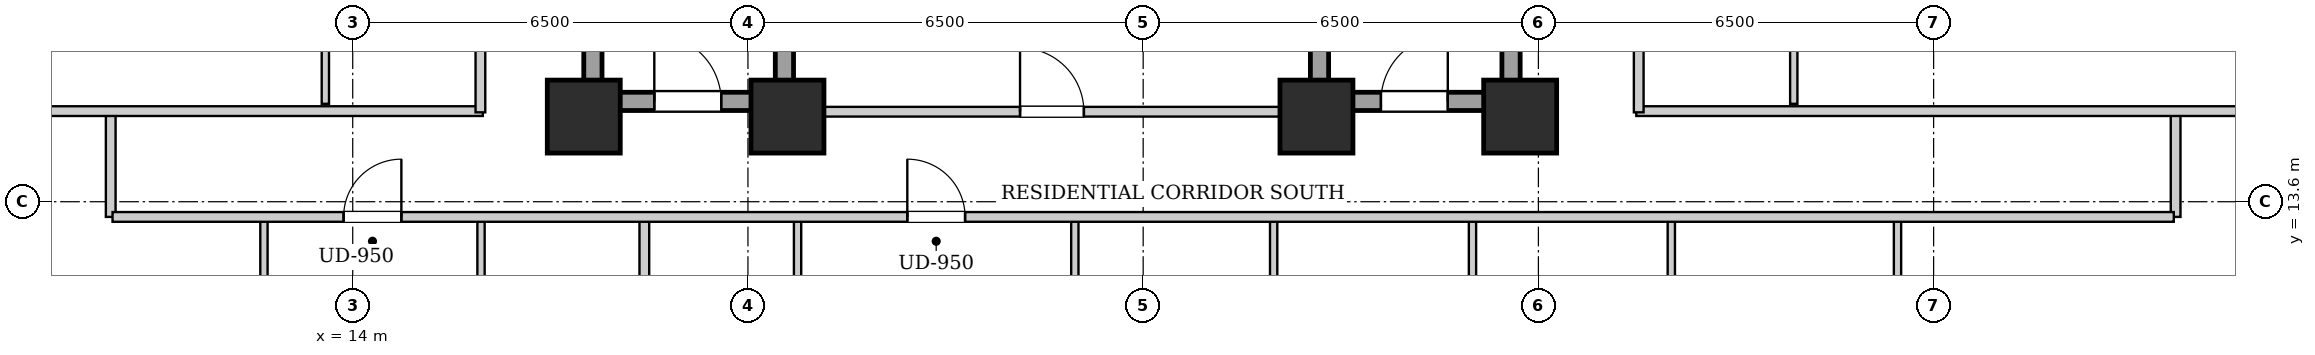
"""IFC4 building model, lengths in metres.
Left out: names, types, materials, properties, quantities, classifications, styles, units other than length and angle.
Written with IfcOpenShell. Run it as: python <this file> out.ifc"""

import sys

from ifc_helpers import new_model, si_unit, direction, frame, frame_2d, origin, origin_2d, place, context, subcontext, project, spatial, rectangle, extrude, element, fill, save


model = new_model("IFC4")
c1 = context("Model", 3, precision=1e-05, world=origin(), true_north=direction((0.0, 1.0)))
c2 = subcontext(c1, "Body", "Model", "MODEL_VIEW")
j1 = project(units=[si_unit("LENGTHUNIT", "METRE"), si_unit("PLANEANGLEUNIT", "RADIAN")], contexts=[c1])
p1 = place(None, origin())
s1 = spatial("IfcSite", under=j1, at=p1, CompositionType="ELEMENT")
p2 = place(p1, origin())
s2 = spatial("IfcBuilding", under=s1, at=p2, CompositionType="ELEMENT")
p3 = place(p2, frame((0.0, 0.0, 67.4)))
s3 = spatial("IfcBuildingStorey", under=s2, at=p3, CompositionType="ELEMENT", Elevation=67.4)
for number, where, z_axis, x_axis in (
    (1, (17.8, 15.0, 0.0), (0.0, 0.0, 1.0), (1.0, 0.0, 0.0)),
    (2, (21.15, 15.0, 0.0), (0.0, 0.0, 1.0), (1.0, 0.0, 0.0)),
    (3, (29.85, 15.0, 0.0), (0.0, 0.0, 1.0), (1.0, 0.0, 0.0)),
    (4, (33.2, 15.0, 0.0), (0.0, 0.0, 1.0), (1.0, 0.0, 0.0)),
):
    element("IfcColumn", number, at=place(p3, frame(where, z_axis=z_axis, x_axis=x_axis)), inside=s3, PredefinedType="COLUMN", context=c2, shape_type="SweptSolid", body=[
        extrude(rectangle(XDim=1.2, YDim=1.2, at=origin_2d()), origin(), (0.0, 0.0, 1.0), 3.2),
    ])
for number, where, z_axis, x_axis in (
    (5, (17.95, 15.1, 0.0), (0.0, 0.0, 1.0), (0.0, 1.0, 0.0)),
    (6, (21.1, 15.1, 0.0), (0.0, 0.0, 1.0), (0.0, 1.0, 0.0)),
):
    element("IfcWall", number, at=place(p3, frame(where, z_axis=z_axis, x_axis=x_axis)), inside=s3, PredefinedType="SHEAR", context=c2, shape_type="SweptSolid", body=[
        extrude(rectangle(XDim=9.0, YDim=0.3, at=frame_2d((4.5, 0.0))), origin(), (0.0, 0.0, 1.0), 2.88),
    ])
p4 = place(p3, frame((18.1, 15.25, 0.0), z_axis=(0.0, 0.0, 1.0), x_axis=(1.0, 0.0, 0.0)))
e7 = element("IfcWall", 7, at=p4, inside=s3, PredefinedType="SHEAR", context=c2, shape_type="SweptSolid", body=[
    extrude(rectangle(XDim=2.85, YDim=0.3, at=frame_2d((1.425, 0.0))), origin(), (0.0, 0.0, 1.0), 2.88),
])
p5 = place(p4, frame((0.86, 0.0, 0.0)))
e8 = element("IfcOpeningElement", 8, at=p5, cuts=e7, PredefinedType="OPENING", context=c2, shape_type="SweptSolid", body=[
    extrude(rectangle(XDim=1.1, YDim=2.05, at=frame_2d((0.55, 1.025))), frame((0.0, 0.16, 0.0), z_axis=(0.0, -1.0, 0.0), x_axis=(1.0, 0.0, 0.0)), (0.0, 0.0, 1.0), 0.32),
])
for number, where, z_axis, x_axis in (
    (9, (29.9, 15.1, 0.0), (0.0, 0.0, 1.0), (0.0, 1.0, 0.0)),
    (10, (33.05, 15.1, 0.0), (0.0, 0.0, 1.0), (0.0, 1.0, 0.0)),
):
    element("IfcWall", number, at=place(p3, frame(where, z_axis=z_axis, x_axis=x_axis)), inside=s3, PredefinedType="SHEAR", context=c2, shape_type="SweptSolid", body=[
        extrude(rectangle(XDim=9.0, YDim=0.3, at=frame_2d((4.5, 0.0))), origin(), (0.0, 0.0, 1.0), 2.88),
    ])
p6 = place(p3, frame((30.05, 15.25, 0.0), z_axis=(0.0, 0.0, 1.0), x_axis=(1.0, 0.0, 0.0)))
e11 = element("IfcWall", 11, at=p6, inside=s3, PredefinedType="SHEAR", context=c2, shape_type="SweptSolid", body=[
    extrude(rectangle(XDim=2.85, YDim=0.3, at=frame_2d((1.425, 0.0))), origin(), (0.0, 0.0, 1.0), 2.88),
])
p7 = place(p6, frame((0.86, 0.0, 0.0)))
e12 = element("IfcOpeningElement", 12, at=p7, cuts=e11, PredefinedType="OPENING", context=c2, shape_type="SweptSolid", body=[
    extrude(rectangle(XDim=1.1, YDim=2.05, at=frame_2d((0.55, 1.025))), frame((0.0, 0.16, 0.0), z_axis=(0.0, -1.0, 0.0), x_axis=(1.0, 0.0, 0.0)), (0.0, 0.0, 1.0), 0.32),
])
p8 = place(p3, frame((21.25, 15.08, 0.0), z_axis=(0.0, 0.0, 1.0), x_axis=(1.0, 0.0, 0.0)))
e13 = element("IfcWall", 13, at=p8, inside=s3, PredefinedType="PARTITIONING", context=c2, shape_type="SweptSolid", body=[
    extrude(rectangle(XDim=8.5, YDim=0.16, at=frame_2d((4.25, 0.0))), origin(), (0.0, 0.0, 1.0), 2.172),
])
p9 = place(p8, frame((3.725, 0.0, 0.0)))
e14 = element("IfcOpeningElement", 14, at=p9, cuts=e13, PredefinedType="OPENING", context=c2, shape_type="SweptSolid", body=[
    extrude(rectangle(XDim=1.05, YDim=2.05, at=frame_2d((0.525, 1.025))), frame((0.0, 0.09, 0.0), z_axis=(0.0, -1.0, 0.0), x_axis=(1.0, 0.0, 0.0)), (0.0, 0.0, 1.0), 0.18),
])
for number, where, z_axis, x_axis in (
    (15, (10.02, 13.35, 0.0), (0.0, 0.0, 1.0), (0.0, 1.0, 0.0)),
    (16, (43.98, 13.35, 0.0), (0.0, 0.0, 1.0), (0.0, 1.0, 0.0)),
):
    element("IfcWall", number, at=place(p3, frame(where, z_axis=z_axis, x_axis=x_axis)), inside=s3, PredefinedType="PARTITIONING", context=c2, shape_type="SweptSolid", body=[
        extrude(rectangle(XDim=1.74, YDim=0.16, at=frame_2d((0.87, 0.0))), origin(), (0.0, 0.0, 1.0), 2.88),
    ])
p10 = place(p3, frame((7.78, 15.09, 0.0), z_axis=(0.0, 0.0, 1.0), x_axis=(1.0, 0.0, 0.0)))
e17 = element("IfcWall", 17, at=p10, inside=s3, PredefinedType="PARTITIONING", context=c2, shape_type="SweptSolid", body=[
    extrude(rectangle(XDim=8.36, YDim=0.16, at=frame_2d((4.18, 0.0))), origin(), (0.0, 0.0, 1.0), 2.172),
])
p11 = place(p3, frame((35.11, 15.09, 0.0), z_axis=(0.0, 0.0, 1.0), x_axis=(1.0, 0.0, 0.0)))
e18 = element("IfcWall", 18, at=p11, inside=s3, PredefinedType="PARTITIONING", context=c2, shape_type="SweptSolid", body=[
    extrude(rectangle(XDim=11.11, YDim=0.16, at=frame_2d((5.555, 0.0))), origin(), (0.0, 0.0, 1.0), 2.172),
])
p12 = place(p3, frame((12.54, 10.46, 0.0), z_axis=(0.0, 0.0, 1.0), x_axis=(0.0, 1.0, 0.0)))
e19 = element("IfcWall", 19, at=p12, inside=s3, PredefinedType="PARTITIONING", context=c2, shape_type="SweptSolid", body=[
    extrude(rectangle(XDim=2.85, YDim=0.12, at=frame_2d((1.425, 0.0))), origin(), (0.0, 0.0, 1.0), 2.88),
])
p13 = place(p12, frame((0.995, 0.0, 0.0)))
e20 = element("IfcOpeningElement", 20, at=p13, cuts=e19, PredefinedType="OPENING", context=c2, shape_type="SweptSolid", body=[
    extrude(rectangle(XDim=0.86, YDim=2.05, at=frame_2d((0.43, 1.025))), frame((0.0, 0.07, 0.0), z_axis=(0.0, -1.0, 0.0), x_axis=(1.0, 0.0, 0.0)), (0.0, 0.0, 1.0), 0.14),
])
p14 = place(p3, frame((16.11, 10.46, 0.0), z_axis=(0.0, 0.0, 1.0), x_axis=(0.0, 1.0, 0.0)))
e21 = element("IfcWall", 21, at=p14, inside=s3, PredefinedType="PARTITIONING", context=c2, shape_type="SweptSolid", body=[
    extrude(rectangle(XDim=2.85, YDim=0.12, at=frame_2d((1.425, 0.0))), origin(), (0.0, 0.0, 1.0), 2.88),
])
p15 = place(p14, frame((0.975, 0.0, 0.0)))
e22 = element("IfcOpeningElement", 22, at=p15, cuts=e21, PredefinedType="OPENING", context=c2, shape_type="SweptSolid", body=[
    extrude(rectangle(XDim=0.9, YDim=2.05, at=frame_2d((0.45, 1.025))), frame((0.0, 0.07, 0.0), z_axis=(0.0, -1.0, 0.0), x_axis=(1.0, 0.0, 0.0)), (0.0, 0.0, 1.0), 0.14),
])
p16 = place(p3, frame((18.796, 0.28, 0.0), z_axis=(0.0, 0.0, 1.0), x_axis=(0.0, 1.0, 0.0)))
e23 = element("IfcWall", 23, at=p16, inside=s3, PredefinedType="PARTITIONING", context=c2, shape_type="SweptSolid", body=[
    extrude(rectangle(XDim=13.03, YDim=0.16, at=frame_2d((6.515, 0.0))), origin(), (0.0, 0.0, 1.0), 2.88),
])
p17 = place(p3, frame((21.316, 10.46, 0.0), z_axis=(0.0, 0.0, 1.0), x_axis=(0.0, 1.0, 0.0)))
e24 = element("IfcWall", 24, at=p17, inside=s3, PredefinedType="PARTITIONING", context=c2, shape_type="SweptSolid", body=[
    extrude(rectangle(XDim=2.85, YDim=0.12, at=frame_2d((1.425, 0.0))), origin(), (0.0, 0.0, 1.0), 2.88),
])
p18 = place(p17, frame((0.995, 0.0, 0.0)))
e25 = element("IfcOpeningElement", 25, at=p18, cuts=e24, PredefinedType="OPENING", context=c2, shape_type="SweptSolid", body=[
    extrude(rectangle(XDim=0.86, YDim=2.05, at=frame_2d((0.43, 1.025))), frame((0.0, 0.07, 0.0), z_axis=(0.0, -1.0, 0.0), x_axis=(1.0, 0.0, 0.0)), (0.0, 0.0, 1.0), 0.14),
])
p19 = place(p3, frame((25.876, 10.46, 0.0), z_axis=(0.0, 0.0, 1.0), x_axis=(0.0, 1.0, 0.0)))
e26 = element("IfcWall", 26, at=p19, inside=s3, PredefinedType="PARTITIONING", context=c2, shape_type="SweptSolid", body=[
    extrude(rectangle(XDim=2.85, YDim=0.12, at=frame_2d((1.425, 0.0))), origin(), (0.0, 0.0, 1.0), 2.88),
])
p20 = place(p19, frame((0.975, 0.0, 0.0)))
e27 = element("IfcOpeningElement", 27, at=p20, cuts=e26, PredefinedType="OPENING", context=c2, shape_type="SweptSolid", body=[
    extrude(rectangle(XDim=0.9, YDim=2.05, at=frame_2d((0.45, 1.025))), frame((0.0, 0.07, 0.0), z_axis=(0.0, -1.0, 0.0), x_axis=(1.0, 0.0, 0.0)), (0.0, 0.0, 1.0), 0.14),
])
p21 = place(p3, frame((29.146, 10.46, 0.0), z_axis=(0.0, 0.0, 1.0), x_axis=(0.0, 1.0, 0.0)))
e28 = element("IfcWall", 28, at=p21, inside=s3, PredefinedType="PARTITIONING", context=c2, shape_type="SweptSolid", body=[
    extrude(rectangle(XDim=2.85, YDim=0.12, at=frame_2d((1.425, 0.0))), origin(), (0.0, 0.0, 1.0), 2.88),
])
p22 = place(p21, frame((0.975, 0.0, 0.0)))
e29 = element("IfcOpeningElement", 29, at=p22, cuts=e28, PredefinedType="OPENING", context=c2, shape_type="SweptSolid", body=[
    extrude(rectangle(XDim=0.9, YDim=2.05, at=frame_2d((0.45, 1.025))), frame((0.0, 0.07, 0.0), z_axis=(0.0, -1.0, 0.0), x_axis=(1.0, 0.0, 0.0)), (0.0, 0.0, 1.0), 0.14),
])
p23 = place(p3, frame((32.416, 10.46, 0.0), z_axis=(0.0, 0.0, 1.0), x_axis=(0.0, 1.0, 0.0)))
e30 = element("IfcWall", 30, at=p23, inside=s3, PredefinedType="PARTITIONING", context=c2, shape_type="SweptSolid", body=[
    extrude(rectangle(XDim=2.85, YDim=0.12, at=frame_2d((1.425, 0.0))), origin(), (0.0, 0.0, 1.0), 2.88),
])
p24 = place(p23, frame((0.975, 0.0, 0.0)))
e31 = element("IfcOpeningElement", 31, at=p24, cuts=e30, PredefinedType="OPENING", context=c2, shape_type="SweptSolid", body=[
    extrude(rectangle(XDim=0.9, YDim=2.05, at=frame_2d((0.45, 1.025))), frame((0.0, 0.07, 0.0), z_axis=(0.0, -1.0, 0.0), x_axis=(1.0, 0.0, 0.0)), (0.0, 0.0, 1.0), 0.14),
])
p25 = place(p3, frame((35.686, 10.46, 0.0), z_axis=(0.0, 0.0, 1.0), x_axis=(0.0, 1.0, 0.0)))
e32 = element("IfcWall", 32, at=p25, inside=s3, PredefinedType="PARTITIONING", context=c2, shape_type="SweptSolid", body=[
    extrude(rectangle(XDim=2.85, YDim=0.12, at=frame_2d((1.425, 0.0))), origin(), (0.0, 0.0, 1.0), 2.88),
])
p26 = place(p25, frame((0.975, 0.0, 0.0)))
e33 = element("IfcOpeningElement", 33, at=p26, cuts=e32, PredefinedType="OPENING", context=c2, shape_type="SweptSolid", body=[
    extrude(rectangle(XDim=0.9, YDim=2.05, at=frame_2d((0.45, 1.025))), frame((0.0, 0.07, 0.0), z_axis=(0.0, -1.0, 0.0), x_axis=(1.0, 0.0, 0.0)), (0.0, 0.0, 1.0), 0.14),
])
p27 = place(p3, frame((39.406, 10.46, 0.0), z_axis=(0.0, 0.0, 1.0), x_axis=(0.0, 1.0, 0.0)))
e34 = element("IfcWall", 34, at=p27, inside=s3, PredefinedType="PARTITIONING", context=c2, shape_type="SweptSolid", body=[
    extrude(rectangle(XDim=2.85, YDim=0.12, at=frame_2d((1.425, 0.0))), origin(), (0.0, 0.0, 1.0), 2.88),
])
p28 = place(p27, frame((0.975, 0.0, 0.0)))
e35 = element("IfcOpeningElement", 35, at=p28, cuts=e34, PredefinedType="OPENING", context=c2, shape_type="SweptSolid", body=[
    extrude(rectangle(XDim=0.9, YDim=2.05, at=frame_2d((0.45, 1.025))), frame((0.0, 0.07, 0.0), z_axis=(0.0, -1.0, 0.0), x_axis=(1.0, 0.0, 0.0)), (0.0, 0.0, 1.0), 0.14),
])
p29 = place(p3, frame((13.55, 15.21, 0.0), z_axis=(0.0, 0.0, 1.0), x_axis=(0.0, 1.0, 0.0)))
e36 = element("IfcWall", 36, at=p29, inside=s3, PredefinedType="PARTITIONING", context=c2, shape_type="SweptSolid", body=[
    extrude(rectangle(XDim=2.159, YDim=0.12, at=frame_2d((1.08, 0.0))), origin(), (0.0, 0.0, 1.0), 2.88),
])
p30 = place(p3, frame((37.7, 15.21, 0.0), z_axis=(0.0, 0.0, 1.0), x_axis=(0.0, 1.0, 0.0)))
e37 = element("IfcWall", 37, at=p30, inside=s3, PredefinedType="PARTITIONING", context=c2, shape_type="SweptSolid", body=[
    extrude(rectangle(XDim=2.3, YDim=0.12, at=frame_2d((1.15, 0.0))), origin(), (0.0, 0.0, 1.0), 2.88),
])
p31 = place(p3, frame((10.05, 13.35, 0.0), z_axis=(0.0, 0.0, 1.0), x_axis=(1.0, 0.0, 0.0)))
e38 = element("IfcWall", 38, at=p31, inside=s3, PredefinedType="PARTITIONING", context=c2, shape_type="SweptSolid", body=[
    extrude(rectangle(XDim=33.9, YDim=0.16, at=frame_2d((16.95, 0.0))), origin(), (0.0, 0.0, 1.0), 2.88),
])
p32 = place(p31, frame((3.8, 0.0, 0.0)))
e39 = element("IfcOpeningElement", 39, at=p32, cuts=e38, PredefinedType="OPENING", context=c2, shape_type="SweptSolid", body=[
    extrude(rectangle(XDim=0.95, YDim=2.1, at=frame_2d((0.475, 1.05))), frame((0.0, 0.09, 0.0), z_axis=(0.0, -1.0, 0.0), x_axis=(1.0, 0.0, 0.0)), (0.0, 0.0, 1.0), 0.18),
])
p33 = place(p31, frame((13.071, 0.0, 0.0)))
e40 = element("IfcOpeningElement", 40, at=p33, cuts=e38, PredefinedType="OPENING", context=c2, shape_type="SweptSolid", body=[
    extrude(rectangle(XDim=0.95, YDim=2.1, at=frame_2d((0.475, 1.05))), frame((0.0, 0.09, 0.0), z_axis=(0.0, -1.0, 0.0), x_axis=(1.0, 0.0, 0.0)), (0.0, 0.0, 1.0), 0.18),
])
p34 = place(p3, frame((16.1, 15.07, 0.0), z_axis=(0.0, 0.0, 1.0), x_axis=(0.0, 1.0, 0.0)))
e41 = element("IfcWall", 41, at=p34, inside=s3, PredefinedType="PARTITIONING", context=c2, shape_type="SweptSolid", body=[
    extrude(rectangle(XDim=13.93, YDim=0.16, at=frame_2d((6.965, 0.0))), origin(), (0.0, 0.0, 1.0), 2.88),
])
p35 = place(p34, frame((4.661, 0.0, 0.0)))
e42 = element("IfcOpeningElement", 42, at=p35, cuts=e41, PredefinedType="OPENING", context=c2, shape_type="SweptSolid", body=[
    extrude(rectangle(XDim=0.95, YDim=2.1, at=frame_2d((0.475, 1.05))), frame((0.0, 0.09, 0.0), z_axis=(0.0, -1.0, 0.0), x_axis=(1.0, 0.0, 0.0)), (0.0, 0.0, 1.0), 0.18),
])
p36 = place(p34, frame((11.411, 0.0, 0.0)))
e43 = element("IfcOpeningElement", 43, at=p36, cuts=e41, PredefinedType="OPENING", context=c2, shape_type="SweptSolid", body=[
    extrude(rectangle(XDim=0.95, YDim=2.1, at=frame_2d((0.475, 1.05))), frame((0.0, 0.09, 0.0), z_axis=(0.0, -1.0, 0.0), x_axis=(1.0, 0.0, 0.0)), (0.0, 0.0, 1.0), 0.18),
])
p37 = place(p3, frame((35.15, 15.07, 0.0), z_axis=(0.0, 0.0, 1.0), x_axis=(0.0, 1.0, 0.0)))
e44 = element("IfcWall", 44, at=p37, inside=s3, PredefinedType="PARTITIONING", context=c2, shape_type="SweptSolid", body=[
    extrude(rectangle(XDim=13.93, YDim=0.16, at=frame_2d((6.965, 0.0))), origin(), (0.0, 0.0, 1.0), 2.88),
])
p38 = place(p37, frame((4.385, 0.0, 0.0)))
e45 = element("IfcOpeningElement", 45, at=p38, cuts=e44, PredefinedType="OPENING", context=c2, shape_type="SweptSolid", body=[
    extrude(rectangle(XDim=0.95, YDim=2.1, at=frame_2d((0.475, 1.05))), frame((0.0, 0.09, 0.0), z_axis=(0.0, -1.0, 0.0), x_axis=(1.0, 0.0, 0.0)), (0.0, 0.0, 1.0), 0.18),
])
p39 = place(p5, origin())
e46 = element("IfcDoor", 46, at=p39, inside=s3, OperationType="SINGLE_SWING_LEFT", PredefinedType="DOOR", context=c2, shape_type="SweptSolid", body=[
    extrude(rectangle(XDim=1.1, YDim=2.05, at=frame_2d((0.55, 1.025))), frame((0.0, 0.025, 0.0), z_axis=(0.0, -1.0, 0.0), x_axis=(1.0, 0.0, 0.0)), (0.0, 0.0, 1.0), 0.05),
])
fill(e8, e46)
p40 = place(p7, origin())
e47 = element("IfcDoor", 47, at=p40, inside=s3, OperationType="SINGLE_SWING_RIGHT", PredefinedType="DOOR", context=c2, shape_type="SweptSolid", body=[
    extrude(rectangle(XDim=1.1, YDim=2.05, at=frame_2d((0.55, 1.025))), frame((0.0, 0.025, 0.0), z_axis=(0.0, -1.0, 0.0), x_axis=(1.0, 0.0, 0.0)), (0.0, 0.0, 1.0), 0.05),
])
fill(e12, e47)
p41 = place(p9, origin())
e48 = element("IfcDoor", 48, at=p41, inside=s3, OperationType="SINGLE_SWING_LEFT", PredefinedType="DOOR", context=c2, shape_type="SweptSolid", body=[
    extrude(rectangle(XDim=1.05, YDim=2.05, at=frame_2d((0.525, 1.025))), frame((0.0, 0.025, 0.0), z_axis=(0.0, -1.0, 0.0), x_axis=(1.0, 0.0, 0.0)), (0.0, 0.0, 1.0), 0.05),
])
fill(e14, e48)
p42 = place(p32, origin())
e49 = element("IfcDoor", 49, at=p42, inside=s3, OperationType="SINGLE_SWING_RIGHT", PredefinedType="DOOR", context=c2, shape_type="SweptSolid", body=[
    extrude(rectangle(XDim=0.95, YDim=2.1, at=frame_2d((0.475, 1.05))), frame((0.0, 0.025, 0.0), z_axis=(0.0, -1.0, 0.0), x_axis=(1.0, 0.0, 0.0)), (0.0, 0.0, 1.0), 0.05),
])
fill(e39, e49)
p43 = place(p33, origin())
e50 = element("IfcDoor", 50, at=p43, inside=s3, OperationType="SINGLE_SWING_LEFT", PredefinedType="DOOR", context=c2, shape_type="SweptSolid", body=[
    extrude(rectangle(XDim=0.95, YDim=2.1, at=frame_2d((0.475, 1.05))), frame((0.0, 0.025, 0.0), z_axis=(0.0, -1.0, 0.0), x_axis=(1.0, 0.0, 0.0)), (0.0, 0.0, 1.0), 0.05),
])
fill(e40, e50)
save(model, sys.argv[1])
